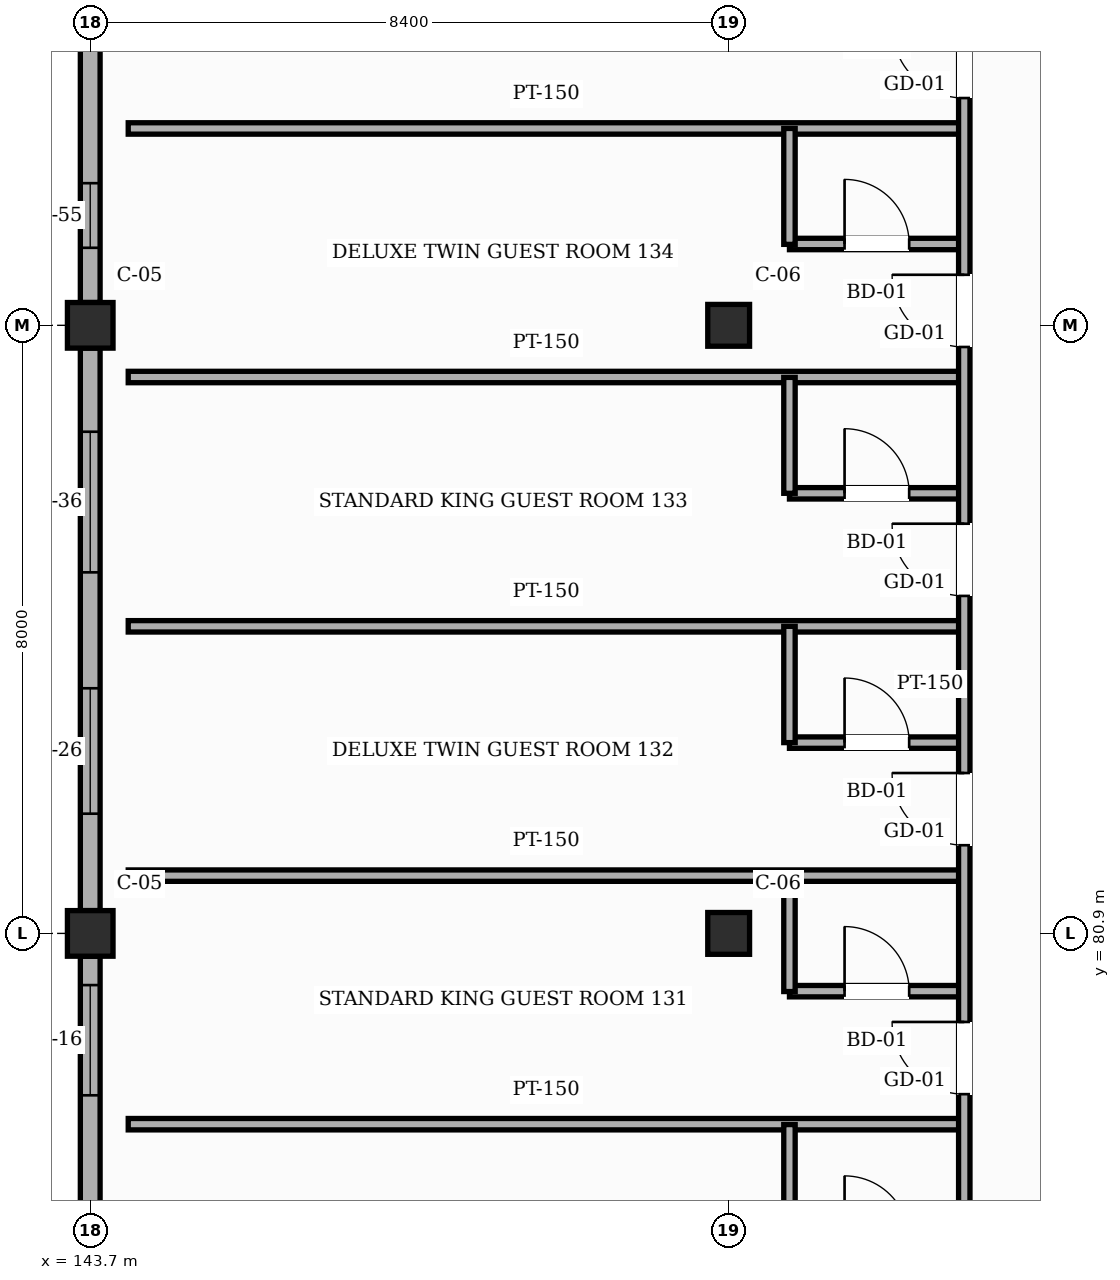
"""IFC4 building model, lengths in metres.
Left out: names, types, materials, properties, quantities, classifications, styles, units other than length and angle.
Written with IfcOpenShell. Run it as: python <this file> out.ifc"""

import sys

from ifc_helpers import new_model, si_unit, direction, frame, frame_2d, origin, origin_2d, place, context, subcontext, project, spatial, rectangle, hollow_rectangle, extrude, element, fill, save


model = new_model("IFC4")
c1 = context("Model", 3, precision=1e-05, world=origin(), true_north=direction((0.0, 1.0)))
c2 = subcontext(c1, "Body", "Model", "MODEL_VIEW")
j1 = project(units=[si_unit("LENGTHUNIT", "METRE"), si_unit("PLANEANGLEUNIT", "RADIAN")], contexts=[c1])
p1 = place(None, origin())
s1 = spatial("IfcSite", under=j1, at=p1, CompositionType="ELEMENT")
p2 = place(p1, origin())
s2 = spatial("IfcBuilding", under=s1, at=p2, CompositionType="ELEMENT")
p3 = place(p2, frame((0.0, 0.0, 28.2)))
s3 = spatial("IfcBuildingStorey", under=s2, at=p3, CompositionType="ELEMENT", Elevation=28.2)
for number, where, z_axis, x_axis in (
    (1, (143.7, 80.9, 0.0), (0.0, 0.0, 1.0), (1.0, 0.0, 0.0)),
    (2, (143.7, 88.9, 0.0), (0.0, 0.0, 1.0), (1.0, 0.0, 0.0)),
):
    element("IfcColumn", number, at=place(p3, frame(where, z_axis=z_axis, x_axis=x_axis)), inside=s3, PredefinedType="COLUMN", context=c2, shape_type="SweptSolid", body=[
        extrude(hollow_rectangle(XDim=0.6, YDim=0.6, WallThickness=0.025, InnerFilletRadius=0.025, OuterFilletRadius=0.05, at=origin_2d()), origin(), (0.0, 0.0, 1.0), 3.6),
    ])
for number, where, z_axis, x_axis in (
    (3, (152.1, 80.9, 0.0), (0.0, 0.0, 1.0), (1.0, 0.0, 0.0)),
    (4, (152.1, 88.9, 0.0), (0.0, 0.0, 1.0), (1.0, 0.0, 0.0)),
):
    element("IfcColumn", number, at=place(p3, frame(where, z_axis=z_axis, x_axis=x_axis)), inside=s3, PredefinedType="COLUMN", context=c2, shape_type="SweptSolid", body=[
        extrude(hollow_rectangle(XDim=0.55, YDim=0.55, WallThickness=0.022, InnerFilletRadius=0.022, OuterFilletRadius=0.044, at=origin_2d()), origin(), (0.0, 0.0, 1.0), 3.6),
    ])
p4 = place(p3, frame((143.7, 73.65, 0.0), z_axis=(0.0, 0.0, 1.0), x_axis=(0.0, 1.0, 0.0)))
e5 = element("IfcWall", 5, at=p4, inside=s3, PredefinedType="SOLIDWALL", context=c2, shape_type="SweptSolid", body=[
    extrude(rectangle(XDim=6.95, YDim=0.26, at=frame_2d((3.475, 0.0))), origin(), (0.0, 0.0, 1.0), 2.805),
])
p5 = place(p4, frame((0.305, 0.0, 0.85)))
e6 = element("IfcOpeningElement", 6, at=p5, cuts=e5, PredefinedType="OPENING", context=c2, shape_type="SweptSolid", body=[
    extrude(rectangle(XDim=0.85, YDim=1.35, at=frame_2d((0.425, 0.675))), frame((0.0, 0.14, 0.0), z_axis=(0.0, -1.0, 0.0), x_axis=(1.0, 0.0, 0.0)), (0.0, 0.0, 1.0), 0.28),
])
p6 = place(p4, frame((2.47, 0.0, 0.85)))
e7 = element("IfcOpeningElement", 7, at=p6, cuts=e5, PredefinedType="OPENING", context=c2, shape_type="SweptSolid", body=[
    extrude(rectangle(XDim=1.25, YDim=1.35, at=frame_2d((0.625, 0.675))), frame((0.0, 0.14, 0.0), z_axis=(0.0, -1.0, 0.0), x_axis=(1.0, 0.0, 0.0)), (0.0, 0.0, 1.0), 0.28),
])
p7 = place(p4, frame((5.12, 0.0, 0.85)))
e8 = element("IfcOpeningElement", 8, at=p7, cuts=e5, PredefinedType="OPENING", context=c2, shape_type="SweptSolid", body=[
    extrude(rectangle(XDim=1.45, YDim=1.35, at=frame_2d((0.725, 0.675))), frame((0.0, 0.14, 0.0), z_axis=(0.0, -1.0, 0.0), x_axis=(1.0, 0.0, 0.0)), (0.0, 0.0, 1.0), 0.28),
])
p8 = place(p3, frame((143.7, 81.2, 0.0), z_axis=(0.0, 0.0, 1.0), x_axis=(0.0, 1.0, 0.0)))
e9 = element("IfcWall", 9, at=p8, inside=s3, PredefinedType="SOLIDWALL", context=c2, shape_type="SweptSolid", body=[
    extrude(rectangle(XDim=7.4, YDim=0.26, at=frame_2d((3.7, 0.0))), origin(), (0.0, 0.0, 1.0), 2.805),
])
p9 = place(p8, frame((1.275, 0.0, 0.85)))
e10 = element("IfcOpeningElement", 10, at=p9, cuts=e9, PredefinedType="OPENING", context=c2, shape_type="SweptSolid", body=[
    extrude(rectangle(XDim=1.65, YDim=1.35, at=frame_2d((0.825, 0.675))), frame((0.0, 0.14, 0.0), z_axis=(0.0, -1.0, 0.0), x_axis=(1.0, 0.0, 0.0)), (0.0, 0.0, 1.0), 0.28),
])
p10 = place(p8, frame((4.45, 0.0, 0.85)))
e11 = element("IfcOpeningElement", 11, at=p10, cuts=e9, PredefinedType="OPENING", context=c2, shape_type="SweptSolid", body=[
    extrude(rectangle(XDim=1.85, YDim=1.35, at=frame_2d((0.925, 0.675))), frame((0.0, 0.14, 0.0), z_axis=(0.0, -1.0, 0.0), x_axis=(1.0, 0.0, 0.0)), (0.0, 0.0, 1.0), 0.28),
])
p11 = place(p3, frame((143.7, 89.2, 0.0), z_axis=(0.0, 0.0, 1.0), x_axis=(0.0, 1.0, 0.0)))
e12 = element("IfcWall", 12, at=p11, inside=s3, PredefinedType="SOLIDWALL", context=c2, shape_type="SweptSolid", body=[
    extrude(rectangle(XDim=7.4, YDim=0.26, at=frame_2d((3.7, 0.0))), origin(), (0.0, 0.0, 1.0), 2.805),
])
p12 = place(p11, frame((0.72, 0.0, 0.85)))
e13 = element("IfcOpeningElement", 13, at=p12, cuts=e12, PredefinedType="OPENING", context=c2, shape_type="SweptSolid", body=[
    extrude(rectangle(XDim=0.85, YDim=1.35, at=frame_2d((0.425, 0.675))), frame((0.0, 0.14, 0.0), z_axis=(0.0, -1.0, 0.0), x_axis=(1.0, 0.0, 0.0)), (0.0, 0.0, 1.0), 0.28),
])
p13 = place(p11, frame((3.505, 0.0, 0.85)))
e14 = element("IfcOpeningElement", 14, at=p13, cuts=e12, PredefinedType="OPENING", context=c2, shape_type="SweptSolid", body=[
    extrude(rectangle(XDim=0.85, YDim=1.35, at=frame_2d((0.425, 0.675))), frame((0.0, 0.14, 0.0), z_axis=(0.0, -1.0, 0.0), x_axis=(1.0, 0.0, 0.0)), (0.0, 0.0, 1.0), 0.28),
])
p14 = place(p11, frame((5.81, 0.0, 0.85)))
e15 = element("IfcOpeningElement", 15, at=p14, cuts=e12, PredefinedType="OPENING", context=c2, shape_type="SweptSolid", body=[
    extrude(rectangle(XDim=1.35, YDim=1.35, at=frame_2d((0.675, 0.675))), frame((0.0, 0.14, 0.0), z_axis=(0.0, -1.0, 0.0), x_axis=(1.0, 0.0, 0.0)), (0.0, 0.0, 1.0), 0.28),
])
p15 = place(p3, frame((144.2, 78.39, 0.0), z_axis=(0.0, 0.0, 1.0), x_axis=(1.0, 0.0, 0.0)))
e16 = element("IfcWall", 16, at=p15, inside=s3, PredefinedType="PARTITIONING", context=c2, shape_type="SweptSolid", body=[
    extrude(rectangle(XDim=11.0, YDim=0.15, at=frame_2d((5.5, 0.0))), origin(), (0.0, 0.0, 1.0), 3.365),
])
p16 = place(p3, frame((152.9, 80.14, 0.0), z_axis=(0.0, 0.0, 1.0), x_axis=(1.0, 0.0, 0.0)))
e17 = element("IfcWall", 17, at=p16, inside=s3, PredefinedType="PARTITIONING", context=c2, shape_type="SweptSolid", body=[
    extrude(rectangle(XDim=2.3, YDim=0.15, at=frame_2d((1.15, 0.0))), origin(), (0.0, 0.0, 1.0), 3.365),
])
p17 = place(p16, frame((0.725, 0.0, 0.0)))
e18 = element("IfcOpeningElement", 18, at=p17, cuts=e17, PredefinedType="OPENING", context=c2, shape_type="SweptSolid", body=[
    extrude(rectangle(XDim=0.85, YDim=2.1, at=frame_2d((0.425, 1.05))), frame((0.0, 0.085, 0.0), z_axis=(0.0, -1.0, 0.0), x_axis=(1.0, 0.0, 0.0)), (0.0, 0.0, 1.0), 0.17),
])
p18 = place(p3, frame((144.2, 81.66, 0.0), z_axis=(0.0, 0.0, 1.0), x_axis=(1.0, 0.0, 0.0)))
e19 = element("IfcWall", 19, at=p18, inside=s3, PredefinedType="PARTITIONING", context=c2, shape_type="SweptSolid", body=[
    extrude(rectangle(XDim=11.0, YDim=0.15, at=frame_2d((5.5, 0.0))), origin(), (0.0, 0.0, 1.0), 3.365),
])
p19 = place(p3, frame((152.9, 83.41, 0.0), z_axis=(0.0, 0.0, 1.0), x_axis=(1.0, 0.0, 0.0)))
e20 = element("IfcWall", 20, at=p19, inside=s3, PredefinedType="PARTITIONING", context=c2, shape_type="SweptSolid", body=[
    extrude(rectangle(XDim=2.3, YDim=0.15, at=frame_2d((1.15, 0.0))), origin(), (0.0, 0.0, 1.0), 3.365),
])
p20 = place(p19, frame((0.725, 0.0, 0.0)))
e21 = element("IfcOpeningElement", 21, at=p20, cuts=e20, PredefinedType="OPENING", context=c2, shape_type="SweptSolid", body=[
    extrude(rectangle(XDim=0.85, YDim=2.1, at=frame_2d((0.425, 1.05))), frame((0.0, 0.085, 0.0), z_axis=(0.0, -1.0, 0.0), x_axis=(1.0, 0.0, 0.0)), (0.0, 0.0, 1.0), 0.17),
])
p21 = place(p3, frame((144.2, 84.94, 0.0), z_axis=(0.0, 0.0, 1.0), x_axis=(1.0, 0.0, 0.0)))
e22 = element("IfcWall", 22, at=p21, inside=s3, PredefinedType="PARTITIONING", context=c2, shape_type="SweptSolid", body=[
    extrude(rectangle(XDim=11.0, YDim=0.15, at=frame_2d((5.5, 0.0))), origin(), (0.0, 0.0, 1.0), 3.005),
])
p22 = place(p3, frame((152.9, 86.69, 0.0), z_axis=(0.0, 0.0, 1.0), x_axis=(1.0, 0.0, 0.0)))
e23 = element("IfcWall", 23, at=p22, inside=s3, PredefinedType="PARTITIONING", context=c2, shape_type="SweptSolid", body=[
    extrude(rectangle(XDim=2.3, YDim=0.15, at=frame_2d((1.15, 0.0))), origin(), (0.0, 0.0, 1.0), 3.365),
])
p23 = place(p22, frame((0.725, 0.0, 0.0)))
e24 = element("IfcOpeningElement", 24, at=p23, cuts=e23, PredefinedType="OPENING", context=c2, shape_type="SweptSolid", body=[
    extrude(rectangle(XDim=0.85, YDim=2.1, at=frame_2d((0.425, 1.05))), frame((0.0, 0.085, 0.0), z_axis=(0.0, -1.0, 0.0), x_axis=(1.0, 0.0, 0.0)), (0.0, 0.0, 1.0), 0.17),
])
p24 = place(p3, frame((144.2, 88.22, 0.0), z_axis=(0.0, 0.0, 1.0), x_axis=(1.0, 0.0, 0.0)))
e25 = element("IfcWall", 25, at=p24, inside=s3, PredefinedType="PARTITIONING", context=c2, shape_type="SweptSolid", body=[
    extrude(rectangle(XDim=11.0, YDim=0.15, at=frame_2d((5.5, 0.0))), origin(), (0.0, 0.0, 1.0), 3.365),
])
p25 = place(p3, frame((152.9, 89.97, 0.0), z_axis=(0.0, 0.0, 1.0), x_axis=(1.0, 0.0, 0.0)))
e26 = element("IfcWall", 26, at=p25, inside=s3, PredefinedType="PARTITIONING", context=c2, shape_type="SweptSolid", body=[
    extrude(rectangle(XDim=2.3, YDim=0.15, at=frame_2d((1.15, 0.0))), origin(), (0.0, 0.0, 1.0), 3.365),
])
p26 = place(p25, frame((0.725, 0.0, 0.0)))
e27 = element("IfcOpeningElement", 27, at=p26, cuts=e26, PredefinedType="OPENING", context=c2, shape_type="SweptSolid", body=[
    extrude(rectangle(XDim=0.85, YDim=2.1, at=frame_2d((0.425, 1.05))), frame((0.0, 0.085, 0.0), z_axis=(0.0, -1.0, 0.0), x_axis=(1.0, 0.0, 0.0)), (0.0, 0.0, 1.0), 0.17),
])
p27 = place(p3, frame((144.2, 91.49, 0.0), z_axis=(0.0, 0.0, 1.0), x_axis=(1.0, 0.0, 0.0)))
e28 = element("IfcWall", 28, at=p27, inside=s3, PredefinedType="PARTITIONING", context=c2, shape_type="SweptSolid", body=[
    extrude(rectangle(XDim=11.0, YDim=0.15, at=frame_2d((5.5, 0.0))), origin(), (0.0, 0.0, 1.0), 3.365),
])
for number, where, z_axis, x_axis in (
    (29, (152.9, 76.86, 0.0), (0.0, 0.0, 1.0), (0.0, 1.0, 0.0)),
    (30, (152.9, 80.135, 0.0), (0.0, 0.0, 1.0), (0.0, 1.0, 0.0)),
):
    element("IfcWall", number, at=place(p3, frame(where, z_axis=z_axis, x_axis=x_axis)), inside=s3, PredefinedType="PARTITIONING", context=c2, shape_type="SweptSolid", body=[
        extrude(rectangle(XDim=1.525, YDim=0.15, at=frame_2d((0.762, 0.0))), origin(), (0.0, 0.0, 1.0), 3.365),
    ])
p28 = place(p3, frame((152.9, 83.41, 0.0), z_axis=(0.0, 0.0, 1.0), x_axis=(0.0, 1.0, 0.0)))
e31 = element("IfcWall", 31, at=p28, inside=s3, PredefinedType="PARTITIONING", context=c2, shape_type="SweptSolid", body=[
    extrude(rectangle(XDim=1.53, YDim=0.15, at=frame_2d((0.765, 0.0))), origin(), (0.0, 0.0, 1.0), 3.365),
])
p29 = place(p3, frame((152.9, 86.69, 0.0), z_axis=(0.0, 0.0, 1.0), x_axis=(0.0, 1.0, 0.0)))
e32 = element("IfcWall", 32, at=p29, inside=s3, PredefinedType="PARTITIONING", context=c2, shape_type="SweptSolid", body=[
    extrude(rectangle(XDim=1.525, YDim=0.15, at=frame_2d((0.763, 0.0))), origin(), (0.0, 0.0, 1.0), 3.365),
])
p30 = place(p3, frame((152.9, 89.965, 0.0), z_axis=(0.0, 0.0, 1.0), x_axis=(0.0, 1.0, 0.0)))
e33 = element("IfcWall", 33, at=p30, inside=s3, PredefinedType="PARTITIONING", context=c2, shape_type="SweptSolid", body=[
    extrude(rectangle(XDim=1.525, YDim=0.15, at=frame_2d((0.762, 0.0))), origin(), (0.0, 0.0, 1.0), 3.365),
])
p31 = place(p3, frame((155.2, 62.0, 0.0), z_axis=(0.0, 0.0, 1.0), x_axis=(0.0, 1.0, 0.0)))
e34 = element("IfcWall", 34, at=p31, inside=s3, PredefinedType="PARTITIONING", context=c2, shape_type="SweptSolid", body=[
    extrude(rectangle(XDim=42.6, YDim=0.15, at=frame_2d((21.3, 0.0))), origin(), (0.0, 0.0, 1.0), 3.365),
])
p32 = place(p31, frame((0.325, 0.0, 0.0)))
e35 = element("IfcOpeningElement", 35, at=p32, cuts=e34, PredefinedType="OPENING", context=c2, shape_type="SweptSolid", body=[
    extrude(rectangle(XDim=1.1, YDim=2.2, at=frame_2d((0.55, 1.1))), frame((0.0, 0.085, 0.0), z_axis=(0.0, -1.0, 0.0), x_axis=(1.0, 0.0, 0.0)), (0.0, 0.0, 1.0), 0.17),
])
p33 = place(p31, frame((3.675, 0.0, 0.0)))
e36 = element("IfcOpeningElement", 36, at=p33, cuts=e34, PredefinedType="OPENING", context=c2, shape_type="SweptSolid", body=[
    extrude(rectangle(XDim=0.95, YDim=2.15, at=frame_2d((0.475, 1.075))), frame((0.0, 0.085, 0.0), z_axis=(0.0, -1.0, 0.0), x_axis=(1.0, 0.0, 0.0)), (0.0, 0.0, 1.0), 0.17),
])
p34 = place(p31, frame((6.955, 0.0, 0.0)))
e37 = element("IfcOpeningElement", 37, at=p34, cuts=e34, PredefinedType="OPENING", context=c2, shape_type="SweptSolid", body=[
    extrude(rectangle(XDim=0.95, YDim=2.15, at=frame_2d((0.475, 1.075))), frame((0.0, 0.085, 0.0), z_axis=(0.0, -1.0, 0.0), x_axis=(1.0, 0.0, 0.0)), (0.0, 0.0, 1.0), 0.17),
])
p35 = place(p31, frame((10.23, 0.0, 0.0)))
e38 = element("IfcOpeningElement", 38, at=p35, cuts=e34, PredefinedType="OPENING", context=c2, shape_type="SweptSolid", body=[
    extrude(rectangle(XDim=0.95, YDim=2.15, at=frame_2d((0.475, 1.075))), frame((0.0, 0.085, 0.0), z_axis=(0.0, -1.0, 0.0), x_axis=(1.0, 0.0, 0.0)), (0.0, 0.0, 1.0), 0.17),
])
p36 = place(p31, frame((13.51, 0.0, 0.0)))
e39 = element("IfcOpeningElement", 39, at=p36, cuts=e34, PredefinedType="OPENING", context=c2, shape_type="SweptSolid", body=[
    extrude(rectangle(XDim=0.95, YDim=2.15, at=frame_2d((0.475, 1.075))), frame((0.0, 0.085, 0.0), z_axis=(0.0, -1.0, 0.0), x_axis=(1.0, 0.0, 0.0)), (0.0, 0.0, 1.0), 0.17),
])
p37 = place(p31, frame((16.785, 0.0, 0.0)))
e40 = element("IfcOpeningElement", 40, at=p37, cuts=e34, PredefinedType="OPENING", context=c2, shape_type="SweptSolid", body=[
    extrude(rectangle(XDim=0.95, YDim=2.15, at=frame_2d((0.475, 1.075))), frame((0.0, 0.085, 0.0), z_axis=(0.0, -1.0, 0.0), x_axis=(1.0, 0.0, 0.0)), (0.0, 0.0, 1.0), 0.17),
])
p38 = place(p31, frame((20.06, 0.0, 0.0)))
e41 = element("IfcOpeningElement", 41, at=p38, cuts=e34, PredefinedType="OPENING", context=c2, shape_type="SweptSolid", body=[
    extrude(rectangle(XDim=0.95, YDim=2.15, at=frame_2d((0.475, 1.075))), frame((0.0, 0.085, 0.0), z_axis=(0.0, -1.0, 0.0), x_axis=(1.0, 0.0, 0.0)), (0.0, 0.0, 1.0), 0.17),
])
p39 = place(p31, frame((23.34, 0.0, 0.0)))
e42 = element("IfcOpeningElement", 42, at=p39, cuts=e34, PredefinedType="OPENING", context=c2, shape_type="SweptSolid", body=[
    extrude(rectangle(XDim=0.95, YDim=2.15, at=frame_2d((0.475, 1.075))), frame((0.0, 0.085, 0.0), z_axis=(0.0, -1.0, 0.0), x_axis=(1.0, 0.0, 0.0)), (0.0, 0.0, 1.0), 0.17),
])
p40 = place(p31, frame((26.615, 0.0, 0.0)))
e43 = element("IfcOpeningElement", 43, at=p40, cuts=e34, PredefinedType="OPENING", context=c2, shape_type="SweptSolid", body=[
    extrude(rectangle(XDim=0.95, YDim=2.15, at=frame_2d((0.475, 1.075))), frame((0.0, 0.085, 0.0), z_axis=(0.0, -1.0, 0.0), x_axis=(1.0, 0.0, 0.0)), (0.0, 0.0, 1.0), 0.17),
])
p41 = place(p31, frame((29.89, 0.0, 0.0)))
e44 = element("IfcOpeningElement", 44, at=p41, cuts=e34, PredefinedType="OPENING", context=c2, shape_type="SweptSolid", body=[
    extrude(rectangle(XDim=0.95, YDim=2.15, at=frame_2d((0.475, 1.075))), frame((0.0, 0.085, 0.0), z_axis=(0.0, -1.0, 0.0), x_axis=(1.0, 0.0, 0.0)), (0.0, 0.0, 1.0), 0.17),
])
p42 = place(p31, frame((33.17, 0.0, 0.0)))
e45 = element("IfcOpeningElement", 45, at=p42, cuts=e34, PredefinedType="OPENING", context=c2, shape_type="SweptSolid", body=[
    extrude(rectangle(XDim=0.95, YDim=2.15, at=frame_2d((0.475, 1.075))), frame((0.0, 0.085, 0.0), z_axis=(0.0, -1.0, 0.0), x_axis=(1.0, 0.0, 0.0)), (0.0, 0.0, 1.0), 0.17),
])
p43 = place(p31, frame((36.445, 0.0, 0.0)))
e46 = element("IfcOpeningElement", 46, at=p43, cuts=e34, PredefinedType="OPENING", context=c2, shape_type="SweptSolid", body=[
    extrude(rectangle(XDim=0.95, YDim=2.15, at=frame_2d((0.475, 1.075))), frame((0.0, 0.085, 0.0), z_axis=(0.0, -1.0, 0.0), x_axis=(1.0, 0.0, 0.0)), (0.0, 0.0, 1.0), 0.17),
])
p44 = place(p31, frame((39.725, 0.0, 0.0)))
e47 = element("IfcOpeningElement", 47, at=p44, cuts=e34, PredefinedType="OPENING", context=c2, shape_type="SweptSolid", body=[
    extrude(rectangle(XDim=0.95, YDim=2.15, at=frame_2d((0.475, 1.075))), frame((0.0, 0.085, 0.0), z_axis=(0.0, -1.0, 0.0), x_axis=(1.0, 0.0, 0.0)), (0.0, 0.0, 1.0), 0.17),
])
p45 = place(p7, origin())
e48 = element("IfcWindow", 48, at=p45, inside=s3, PartitioningType="SINGLE_PANEL", PredefinedType="WINDOW", context=c2, shape_type="SweptSolid", body=[
    extrude(rectangle(XDim=1.45, YDim=1.35, at=frame_2d((0.725, 0.675))), frame((0.0, 0.03, 0.0), z_axis=(0.0, -1.0, 0.0), x_axis=(1.0, 0.0, 0.0)), (0.0, 0.0, 1.0), 0.06),
])
fill(e8, e48)
p46 = place(p9, origin())
e49 = element("IfcWindow", 49, at=p46, inside=s3, PartitioningType="SINGLE_PANEL", PredefinedType="WINDOW", context=c2, shape_type="SweptSolid", body=[
    extrude(rectangle(XDim=1.65, YDim=1.35, at=frame_2d((0.825, 0.675))), frame((0.0, 0.03, 0.0), z_axis=(0.0, -1.0, 0.0), x_axis=(1.0, 0.0, 0.0)), (0.0, 0.0, 1.0), 0.06),
])
fill(e10, e49)
p47 = place(p10, origin())
e50 = element("IfcWindow", 50, at=p47, inside=s3, PartitioningType="SINGLE_PANEL", PredefinedType="WINDOW", context=c2, shape_type="SweptSolid", body=[
    extrude(rectangle(XDim=1.85, YDim=1.35, at=frame_2d((0.925, 0.675))), frame((0.0, 0.03, 0.0), z_axis=(0.0, -1.0, 0.0), x_axis=(1.0, 0.0, 0.0)), (0.0, 0.0, 1.0), 0.06),
])
fill(e11, e50)
p48 = place(p12, origin())
e51 = element("IfcWindow", 51, at=p48, inside=s3, PartitioningType="SINGLE_PANEL", PredefinedType="WINDOW", context=c2, shape_type="SweptSolid", body=[
    extrude(rectangle(XDim=0.85, YDim=1.35, at=frame_2d((0.425, 0.675))), frame((0.0, 0.03, 0.0), z_axis=(0.0, -1.0, 0.0), x_axis=(1.0, 0.0, 0.0)), (0.0, 0.0, 1.0), 0.06),
])
fill(e13, e51)
p49 = place(p37, origin())
e52 = element("IfcDoor", 52, at=p49, inside=s3, OperationType="SINGLE_SWING_RIGHT", PredefinedType="DOOR", context=c2, shape_type="SweptSolid", body=[
    extrude(rectangle(XDim=0.95, YDim=2.15, at=frame_2d((0.475, 1.075))), frame((0.0, 0.025, 0.0), z_axis=(0.0, -1.0, 0.0), x_axis=(1.0, 0.0, 0.0)), (0.0, 0.0, 1.0), 0.05),
])
fill(e40, e52)
p50 = place(p17, origin())
e53 = element("IfcDoor", 53, at=p50, inside=s3, OperationType="SINGLE_SWING_LEFT", PredefinedType="DOOR", context=c2, shape_type="SweptSolid", body=[
    extrude(rectangle(XDim=0.85, YDim=2.1, at=frame_2d((0.425, 1.05))), frame((0.0, 0.025, 0.0), z_axis=(0.0, -1.0, 0.0), x_axis=(1.0, 0.0, 0.0)), (0.0, 0.0, 1.0), 0.05),
])
fill(e18, e53)
p51 = place(p38, origin())
e54 = element("IfcDoor", 54, at=p51, inside=s3, OperationType="SINGLE_SWING_RIGHT", PredefinedType="DOOR", context=c2, shape_type="SweptSolid", body=[
    extrude(rectangle(XDim=0.95, YDim=2.15, at=frame_2d((0.475, 1.075))), frame((0.0, 0.025, 0.0), z_axis=(0.0, -1.0, 0.0), x_axis=(1.0, 0.0, 0.0)), (0.0, 0.0, 1.0), 0.05),
])
fill(e41, e54)
p52 = place(p20, origin())
e55 = element("IfcDoor", 55, at=p52, inside=s3, OperationType="SINGLE_SWING_LEFT", PredefinedType="DOOR", context=c2, shape_type="SweptSolid", body=[
    extrude(rectangle(XDim=0.85, YDim=2.1, at=frame_2d((0.425, 1.05))), frame((0.0, 0.025, 0.0), z_axis=(0.0, -1.0, 0.0), x_axis=(1.0, 0.0, 0.0)), (0.0, 0.0, 1.0), 0.05),
])
fill(e21, e55)
p53 = place(p39, origin())
e56 = element("IfcDoor", 56, at=p53, inside=s3, OperationType="SINGLE_SWING_RIGHT", PredefinedType="DOOR", context=c2, shape_type="SweptSolid", body=[
    extrude(rectangle(XDim=0.95, YDim=2.15, at=frame_2d((0.475, 1.075))), frame((0.0, 0.025, 0.0), z_axis=(0.0, -1.0, 0.0), x_axis=(1.0, 0.0, 0.0)), (0.0, 0.0, 1.0), 0.05),
])
fill(e42, e56)
p54 = place(p23, origin())
e57 = element("IfcDoor", 57, at=p54, inside=s3, OperationType="SINGLE_SWING_LEFT", PredefinedType="DOOR", context=c2, shape_type="SweptSolid", body=[
    extrude(rectangle(XDim=0.85, YDim=2.1, at=frame_2d((0.425, 1.05))), frame((0.0, 0.025, 0.0), z_axis=(0.0, -1.0, 0.0), x_axis=(1.0, 0.0, 0.0)), (0.0, 0.0, 1.0), 0.05),
])
fill(e24, e57)
p55 = place(p40, origin())
e58 = element("IfcDoor", 58, at=p55, inside=s3, OperationType="SINGLE_SWING_RIGHT", PredefinedType="DOOR", context=c2, shape_type="SweptSolid", body=[
    extrude(rectangle(XDim=0.95, YDim=2.15, at=frame_2d((0.475, 1.075))), frame((0.0, 0.025, 0.0), z_axis=(0.0, -1.0, 0.0), x_axis=(1.0, 0.0, 0.0)), (0.0, 0.0, 1.0), 0.05),
])
fill(e43, e58)
p56 = place(p26, origin())
e59 = element("IfcDoor", 59, at=p56, inside=s3, OperationType="SINGLE_SWING_LEFT", PredefinedType="DOOR", context=c2, shape_type="SweptSolid", body=[
    extrude(rectangle(XDim=0.85, YDim=2.1, at=frame_2d((0.425, 1.05))), frame((0.0, 0.025, 0.0), z_axis=(0.0, -1.0, 0.0), x_axis=(1.0, 0.0, 0.0)), (0.0, 0.0, 1.0), 0.05),
])
fill(e27, e59)
p57 = place(p41, origin())
e60 = element("IfcDoor", 60, at=p57, inside=s3, OperationType="SINGLE_SWING_RIGHT", PredefinedType="DOOR", context=c2, shape_type="SweptSolid", body=[
    extrude(rectangle(XDim=0.95, YDim=2.15, at=frame_2d((0.475, 1.075))), frame((0.0, 0.025, 0.0), z_axis=(0.0, -1.0, 0.0), x_axis=(1.0, 0.0, 0.0)), (0.0, 0.0, 1.0), 0.05),
])
fill(e44, e60)
save(model, sys.argv[1])
